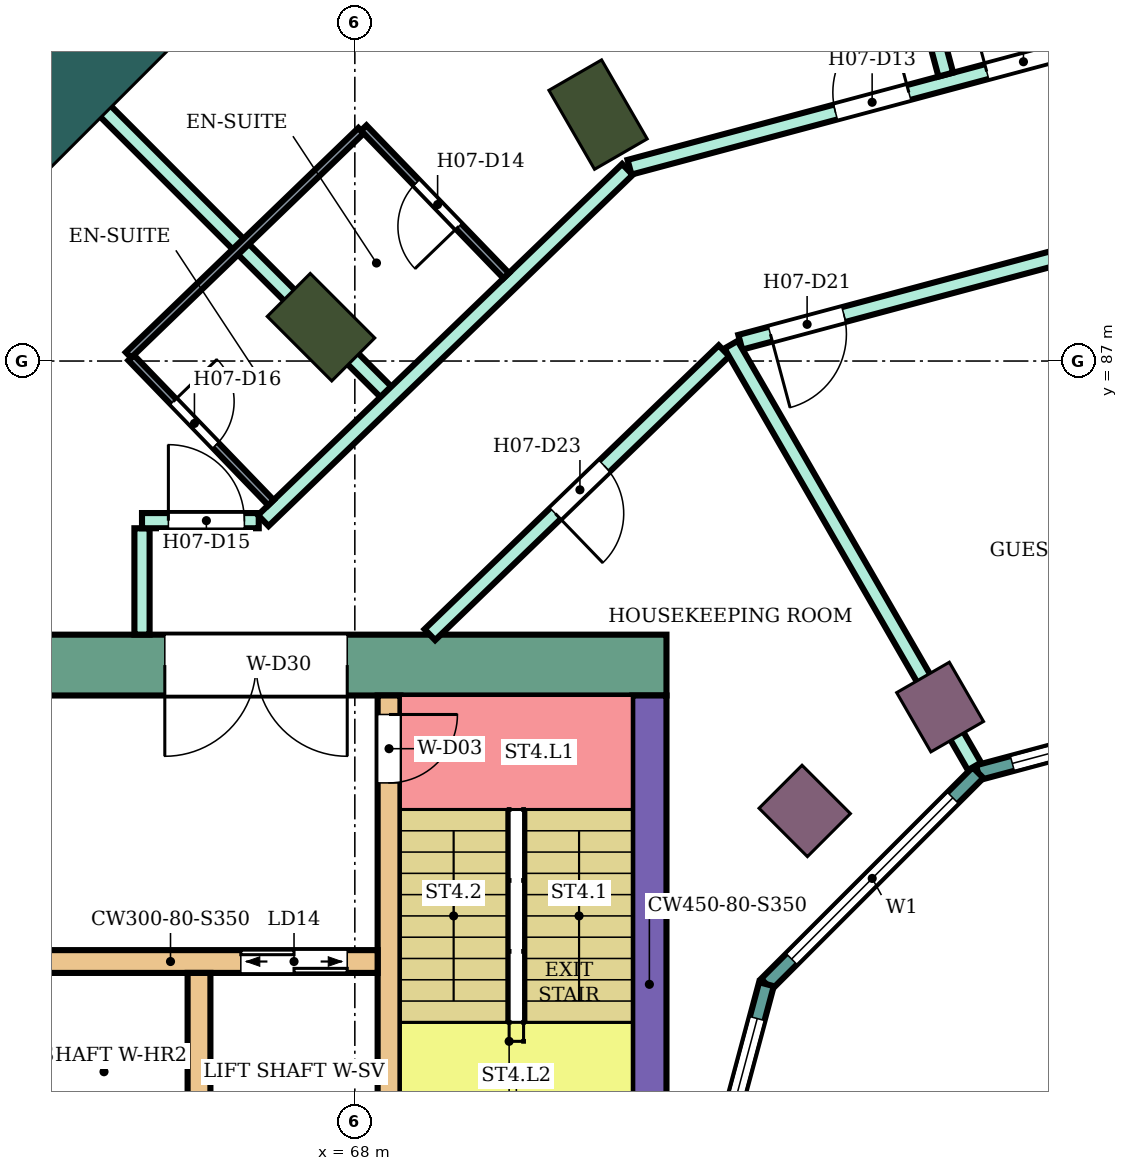
"""IFC4 building model, lengths in metres.
Left out: names, types, materials, properties, quantities, classifications, styles, units other than length and angle.
Written with IfcOpenShell. Run it as: python <this file> out.ifc"""

import sys

from ifc_helpers import new_model, si_unit, direction, frame, frame_2d, origin, origin_2d, place, context, subcontext, project, spatial, rectangle, extrude, element, fill, save


model = new_model("IFC4")
c1 = context("Model", 3, precision=1e-05, world=origin(), true_north=direction((0.0, 1.0)))
c2 = subcontext(c1, "Body", "Model", "MODEL_VIEW")
j1 = project(units=[si_unit("LENGTHUNIT", "METRE"), si_unit("PLANEANGLEUNIT", "RADIAN")], contexts=[c1])
p1 = place(None, origin())
s1 = spatial("IfcSite", under=j1, at=p1, CompositionType="ELEMENT")
p2 = place(p1, origin())
s2 = spatial("IfcBuilding", under=s1, at=p2, CompositionType="ELEMENT")
p3 = place(p2, frame((0.0, 0.0, 105.2)))
s3 = spatial("IfcBuildingStorey", under=s2, at=p3, CompositionType="ELEMENT", Elevation=105.2)
for number, where, z_axis, x_axis in (
    (1, (71.2, 90.242, 0.0), (0.0, 0.0, 1.0), (-0.5, 0.866, 0.0)),
    (2, (67.555, 87.445, 0.0), (0.0, 0.0, 1.0), (-0.707, 0.707, 0.0)),
):
    element("IfcColumn", number, at=place(p3, frame(where, z_axis=z_axis, x_axis=x_axis)), inside=s3, PredefinedType="COLUMN", context=c2, shape_type="SweptSolid", body=[
        extrude(rectangle(XDim=1.2, YDim=0.8, at=origin_2d()), origin(), (0.0, 0.0, 1.0), 3.8),
    ])
for number, where, z_axis, x_axis in (
    (3, (75.7, 82.448, 0.0), (0.0, 0.0, 1.0), (-0.5, 0.866, 0.0)),
    (4, (73.919, 81.081, 0.0), (0.0, 0.0, 1.0), (-0.707, 0.707, 0.0)),
):
    element("IfcColumn", number, at=place(p3, frame(where, z_axis=z_axis, x_axis=x_axis)), inside=s3, PredefinedType="COLUMN", context=c2, shape_type="SweptSolid", body=[
        extrude(rectangle(XDim=0.9, YDim=0.8, at=origin_2d()), origin(), (0.0, 0.0, 1.0), 3.8),
    ])
p4 = place(p3, frame((64.09, 90.91, 0.0), z_axis=(0.0, 0.0, 1.0), x_axis=(-0.707106781187, 0.707106781187, 0.0)))
e5 = element("IfcColumn", 5, at=p4, inside=s3, PredefinedType="COLUMN", context=c2, shape_type="SweptSolid", body=[
    extrude(rectangle(XDim=1.8, YDim=2.4, at=origin_2d()), origin(), (0.0, 0.0, 1.0), 3.8),
])
p5 = place(p3, frame((72.1, 83.0, 0.0), z_axis=(0.0, 0.0, 1.0), x_axis=(-1.0, 0.0, 0.0)))
e6 = element("IfcWall", 6, at=p5, inside=s3, PredefinedType="SHEAR", context=c2, shape_type="SweptSolid", body=[
    extrude(rectangle(XDim=14.7, YDim=0.8, at=frame_2d((7.35, 0.0))), origin(), (0.0, 0.0, 1.0), 3.45),
])
p6 = place(p5, frame((4.2, 0.0, 0.0)))
e7 = element("IfcOpeningElement", 7, at=p6, cuts=e6, PredefinedType="OPENING", context=c2, shape_type="SweptSolid", body=[
    extrude(rectangle(XDim=2.4, YDim=2.4, at=frame_2d((1.2, 1.2))), frame((0.0, 0.41, 0.0), z_axis=(0.0, -1.0, 0.0), x_axis=(1.0, 0.0, 0.0)), (0.0, 0.0, 1.0), 0.82),
])
p7 = place(p3, frame((71.875, 82.6, 0.0), z_axis=(0.0, 0.0, 1.0), x_axis=(0.0, -1.0, 0.0)))
e8 = element("IfcWall", 8, at=p7, inside=s3, PredefinedType="SHEAR", context=c2, shape_type="SweptSolid", body=[
    extrude(rectangle(XDim=7.6, YDim=0.45, at=frame_2d((3.8, 0.0))), origin(), (0.0, 0.0, 1.0), 3.45),
])
p8 = place(p3, frame((68.45, 82.6, 0.0), z_axis=(0.0, 0.0, 1.0), x_axis=(0.0, -1.0, 0.0)))
e9 = element("IfcWall", 9, at=p8, inside=s3, PredefinedType="SHEAR", context=c2, shape_type="SweptSolid", body=[
    extrude(rectangle(XDim=7.6, YDim=0.3, at=frame_2d((3.8, 0.0))), origin(), (0.0, 0.0, 1.0), 3.45),
])
p9 = place(p8, frame((0.25, 0.0, 0.0)))
e10 = element("IfcOpeningElement", 10, at=p9, cuts=e9, PredefinedType="OPENING", context=c2, shape_type="SweptSolid", body=[
    extrude(rectangle(XDim=0.9, YDim=2.1, at=frame_2d((0.45, 1.05))), frame((0.0, 0.16, 0.0), z_axis=(0.0, -1.0, 0.0), x_axis=(1.0, 0.0, 0.0)), (0.0, 0.0, 1.0), 0.32),
])
p10 = place(p3, frame((68.3, 79.1, 0.0), z_axis=(0.0, 0.0, 1.0), x_axis=(-1.0, 0.0, 0.0)))
e11 = element("IfcWall", 11, at=p10, inside=s3, PredefinedType="SHEAR", context=c2, shape_type="SweptSolid", body=[
    extrude(rectangle(XDim=10.9, YDim=0.3, at=frame_2d((5.45, 0.0))), origin(), (0.0, 0.0, 1.0), 3.45),
])
p11 = place(p10, frame((0.4, 0.0, 0.0)))
e12 = element("IfcOpeningElement", 12, at=p11, cuts=e11, PredefinedType="OPENING", context=c2, shape_type="SweptSolid", body=[
    extrude(rectangle(XDim=1.4, YDim=2.1, at=frame_2d((0.7, 1.05))), frame((0.0, 0.16, 0.0), z_axis=(0.0, -1.0, 0.0), x_axis=(1.0, 0.0, 0.0)), (0.0, 0.0, 1.0), 0.32),
])
p12 = place(p10, frame((5.4, 0.0, 0.0)))
e13 = element("IfcOpeningElement", 13, at=p12, cuts=e11, PredefinedType="OPENING", context=c2, shape_type="SweptSolid", body=[
    extrude(rectangle(XDim=1.4, YDim=2.1, at=frame_2d((0.7, 1.05))), frame((0.0, 0.16, 0.0), z_axis=(0.0, -1.0, 0.0), x_axis=(1.0, 0.0, 0.0)), (0.0, 0.0, 1.0), 0.32),
])
p13 = place(p10, frame((8.1, 0.0, 0.0)))
e14 = element("IfcOpeningElement", 14, at=p13, cuts=e11, PredefinedType="OPENING", context=c2, shape_type="SweptSolid", body=[
    extrude(rectangle(XDim=1.0, YDim=2.1, at=frame_2d((0.5, 1.05))), frame((0.0, 0.16, 0.0), z_axis=(0.0, -1.0, 0.0), x_axis=(1.0, 0.0, 0.0)), (0.0, 0.0, 1.0), 0.32),
])
p14 = place(p3, frame((65.95, 78.95, 0.0), z_axis=(0.0, 0.0, 1.0), x_axis=(0.0, -1.0, 0.0)))
e15 = element("IfcWall", 15, at=p14, inside=s3, PredefinedType="SHEAR", context=c2, shape_type="SweptSolid", body=[
    extrude(rectangle(XDim=2.55, YDim=0.3, at=frame_2d((1.275, 0.0))), origin(), (0.0, 0.0, 1.0), 3.45),
])
p15 = place(p3, frame((80.0, 82.604, 0.0), z_axis=(0.0, 0.0, 1.0), x_axis=(-0.965933654434, -0.258789828301, 0.0)))
e16 = element("IfcWall", 16, at=p15, inside=s3, PredefinedType="NOTDEFINED", context=c2, shape_type="SweptSolid", body=[
    extrude(rectangle(XDim=3.936, YDim=0.2, at=frame_2d((1.968, 0.0))), origin(), (0.0, 0.0, 1.0), 3.8),
])
p16 = place(p15, frame((0.468, 0.0, 0.9)))
e17 = element("IfcOpeningElement", 17, at=p16, cuts=e16, PredefinedType="OPENING", context=c2, shape_type="SweptSolid", body=[
    extrude(rectangle(XDim=3.0, YDim=2.3, at=frame_2d((1.5, 1.15))), frame((0.0, 0.11, 0.0), z_axis=(0.0, -1.0, 0.0), x_axis=(1.0, 0.0, 0.0)), (0.0, 0.0, 1.0), 0.22),
])
p17 = place(p3, frame((76.198, 81.585, 0.0), z_axis=(0.0, 0.0, 1.0), x_axis=(-0.707106781187, -0.707106781187, 0.0)))
e18 = element("IfcWall", 18, at=p17, inside=s3, PredefinedType="NOTDEFINED", context=c2, shape_type="SweptSolid", body=[
    extrude(rectangle(XDim=3.936, YDim=0.2, at=frame_2d((1.968, 0.0))), origin(), (0.0, 0.0, 1.0), 3.8),
])
p18 = place(p17, frame((0.468, 0.0, 0.9)))
e19 = element("IfcOpeningElement", 19, at=p18, cuts=e18, PredefinedType="OPENING", context=c2, shape_type="SweptSolid", body=[
    extrude(rectangle(XDim=3.0, YDim=2.3, at=frame_2d((1.5, 1.15))), frame((0.0, 0.11, 0.0), z_axis=(0.0, -1.0, 0.0), x_axis=(1.0, 0.0, 0.0)), (0.0, 0.0, 1.0), 0.22),
])
p19 = place(p3, frame((73.415, 78.802, 0.0), z_axis=(0.0, 0.0, 1.0), x_axis=(-0.258789828301, -0.965933654434, 0.0)))
e20 = element("IfcWall", 20, at=p19, inside=s3, PredefinedType="NOTDEFINED", context=c2, shape_type="SweptSolid", body=[
    extrude(rectangle(XDim=3.936, YDim=0.2, at=frame_2d((1.968, 0.0))), origin(), (0.0, 0.0, 1.0), 3.8),
])
p20 = place(p19, frame((0.468, 0.0, 0.9)))
e21 = element("IfcOpeningElement", 21, at=p20, cuts=e20, PredefinedType="OPENING", context=c2, shape_type="SweptSolid", body=[
    extrude(rectangle(XDim=3.0, YDim=2.3, at=frame_2d((1.5, 1.15))), frame((0.0, 0.11, 0.0), z_axis=(0.0, -1.0, 0.0), x_axis=(1.0, 0.0, 0.0)), (0.0, 0.0, 1.0), 0.22),
])
p21 = place(p3, frame((63.598, 91.407, 0.0), z_axis=(0.0, 0.0, 1.0), x_axis=(0.706981183365, -0.707232356703, 0.0)))
e22 = element("IfcWall", 22, at=p21, inside=s3, PredefinedType="PARTITIONING", context=c2, shape_type="SweptSolid", body=[
    extrude(rectangle(XDim=6.804, YDim=0.2, at=frame_2d((3.402, 0.0))), origin(), (0.0, 0.0, 1.0), 3.35),
])
p22 = place(p3, frame((65.2, 83.401, 0.0), z_axis=(0.0, 0.0, 1.0), x_axis=(0.0, 1.0, 0.0)))
e23 = element("IfcWall", 23, at=p22, inside=s3, PredefinedType="PARTITIONING", context=c2, shape_type="SweptSolid", body=[
    extrude(rectangle(XDim=1.399, YDim=0.2, at=frame_2d((0.7, 0.0))), origin(), (0.0, 0.0, 1.0), 3.35),
])
p23 = place(p3, frame((65.2, 84.9, 0.0), z_axis=(0.0, 0.0, 1.0), x_axis=(1.0, 0.0, 0.0)))
e24 = element("IfcWall", 24, at=p23, inside=s3, PredefinedType="PARTITIONING", context=c2, shape_type="SweptSolid", body=[
    extrude(rectangle(XDim=1.536, YDim=0.2, at=frame_2d((0.768, 0.0))), origin(), (0.0, 0.0, 1.0), 3.35),
])
p24 = place(p23, frame((0.347, 0.0, 0.0)))
e25 = element("IfcOpeningElement", 25, at=p24, cuts=e24, PredefinedType="OPENING", context=c2, shape_type="SweptSolid", body=[
    extrude(rectangle(XDim=1.0, YDim=2.1, at=frame_2d((0.5, 1.05))), frame((0.0, 0.11, 0.0), z_axis=(0.0, -1.0, 0.0), x_axis=(1.0, 0.0, 0.0)), (0.0, 0.0, 1.0), 0.22),
])
p25 = place(p3, frame((66.795, 84.9, 0.0), z_axis=(0.0, 0.0, 1.0), x_axis=(0.719793233107, 0.694188520197, 0.0)))
e26 = element("IfcWall", 26, at=p25, inside=s3, PredefinedType="PARTITIONING", context=c2, shape_type="SweptSolid", body=[
    extrude(rectangle(XDim=6.656, YDim=0.2, at=frame_2d((3.328, 0.0))), origin(), (0.0, 0.0, 1.0), 3.35),
])
p26 = place(p3, frame((68.987, 83.4, 0.0), z_axis=(0.0, 0.0, 1.0), x_axis=(0.719547721855, 0.694442996922, 0.0)))
e27 = element("IfcWall", 27, at=p26, inside=s3, PredefinedType="PARTITIONING", context=c2, shape_type="SweptSolid", body=[
    extrude(rectangle(XDim=5.378, YDim=0.2, at=frame_2d((2.689, 0.0))), origin(), (0.0, 0.0, 1.0), 3.35),
])
p27 = place(p26, frame((2.294, 0.0, 0.0)))
e28 = element("IfcOpeningElement", 28, at=p27, cuts=e27, PredefinedType="OPENING", context=c2, shape_type="SweptSolid", body=[
    extrude(rectangle(XDim=0.9, YDim=2.1, at=frame_2d((0.45, 1.05))), frame((0.0, 0.11, 0.0), z_axis=(0.0, -1.0, 0.0), x_axis=(1.0, 0.0, 0.0)), (0.0, 0.0, 1.0), 0.22),
])
p28 = place(p3, frame((71.614, 89.55, 0.0), z_axis=(0.0, 0.0, 1.0), x_axis=(0.96597505802, 0.258635239832, 0.0)))
e29 = element("IfcWall", 29, at=p28, inside=s3, PredefinedType="PARTITIONING", context=c2, shape_type="SweptSolid", body=[
    extrude(rectangle(XDim=8.592, YDim=0.2, at=frame_2d((4.296, 0.0))), origin(), (0.0, 0.0, 1.0), 3.35),
])
p29 = place(p28, frame((4.865, 0.0, 0.0)))
e30 = element("IfcOpeningElement", 30, at=p29, cuts=e29, PredefinedType="OPENING", context=c2, shape_type="SweptSolid", body=[
    extrude(rectangle(XDim=1.0, YDim=2.1, at=frame_2d((0.5, 1.05))), frame((0.0, 0.11, 0.0), z_axis=(0.0, -1.0, 0.0), x_axis=(1.0, 0.0, 0.0)), (0.0, 0.0, 1.0), 0.22),
])
p30 = place(p28, frame((2.804, 0.0, 0.0)))
e31 = element("IfcOpeningElement", 31, at=p30, cuts=e29, PredefinedType="OPENING", context=c2, shape_type="SweptSolid", body=[
    extrude(rectangle(XDim=1.0, YDim=2.1, at=frame_2d((0.5, 1.05))), frame((0.0, 0.11, 0.0), z_axis=(0.0, -1.0, 0.0), x_axis=(1.0, 0.0, 0.0)), (0.0, 0.0, 1.0), 0.22),
])
p31 = place(p3, frame((73.071, 87.247, 0.0), z_axis=(0.0, 0.0, 1.0), x_axis=(0.965931651205, 0.258797305243, 0.0)))
e32 = element("IfcWall", 32, at=p31, inside=s3, PredefinedType="PARTITIONING", context=c2, shape_type="SweptSolid", body=[
    extrude(rectangle(XDim=7.043, YDim=0.2, at=frame_2d((3.521, 0.0))), origin(), (0.0, 0.0, 1.0), 3.35),
])
p32 = place(p31, frame((0.41, 0.0, 0.0)))
e33 = element("IfcOpeningElement", 33, at=p32, cuts=e32, PredefinedType="OPENING", context=c2, shape_type="SweptSolid", body=[
    extrude(rectangle(XDim=1.0, YDim=2.1, at=frame_2d((0.5, 1.05))), frame((0.0, 0.11, 0.0), z_axis=(0.0, -1.0, 0.0), x_axis=(1.0, 0.0, 0.0)), (0.0, 0.0, 1.0), 0.22),
])
p33 = place(p3, frame((72.95, 87.215, 0.0), z_axis=(0.0, 0.0, 1.0), x_axis=(0.499881928498, -0.866093561667, 0.0)))
e34 = element("IfcWall", 34, at=p33, inside=s3, PredefinedType="PARTITIONING", context=c2, shape_type="SweptSolid", body=[
    extrude(rectangle(XDim=6.405, YDim=0.2, at=frame_2d((3.203, 0.0))), origin(), (0.0, 0.0, 1.0), 3.35),
])
p34 = place(p3, frame((73.323, 99.919, 0.0), z_axis=(0.0, 0.0, 1.0), x_axis=(0.258818956582, -0.965925850008, 0.0)))
e35 = element("IfcWall", 35, at=p34, inside=s3, PredefinedType="PARTITIONING", context=c2, shape_type="SweptSolid", body=[
    extrude(rectangle(XDim=9.473, YDim=0.2, at=frame_2d((4.737, 0.0))), origin(), (0.0, 0.0, 1.0), 3.35),
])
p35 = place(p3, frame((65.057, 87.043, 0.0), z_axis=(0.0, 0.0, 1.0), x_axis=(0.694324808789, -0.719661767708, 0.0)))
e36 = element("IfcWall", 36, at=p35, inside=s3, PredefinedType="PARTITIONING", context=c2, shape_type="SweptSolid", body=[
    extrude(rectangle(XDim=2.65, YDim=0.1, at=frame_2d((1.325, 0.0))), origin(), (0.0, 0.0, 1.0), 3.35),
])
p36 = place(p35, frame((0.8, 0.0, 0.0)))
e37 = element("IfcOpeningElement", 37, at=p36, cuts=e36, PredefinedType="OPENING", context=c2, shape_type="SweptSolid", body=[
    extrude(rectangle(XDim=0.8, YDim=2.1, at=frame_2d((0.4, 1.05))), frame((0.0, 0.06, 0.0), z_axis=(0.0, -1.0, 0.0), x_axis=(1.0, 0.0, 0.0)), (0.0, 0.0, 1.0), 0.12),
])
p37 = place(p3, frame((65.022, 87.079, 0.0), z_axis=(0.0, 0.0, 1.0), x_axis=(0.719684404795, 0.694301344875, 0.0)))
e38 = element("IfcWall", 38, at=p37, inside=s3, PredefinedType="PARTITIONING", context=c2, shape_type="SweptSolid", body=[
    extrude(rectangle(XDim=4.251, YDim=0.1, at=frame_2d((2.125, 0.0))), origin(), (0.0, 0.0, 1.0), 3.35),
])
p38 = place(p3, frame((68.117, 90.066, 0.0), z_axis=(0.0, 0.0, 1.0), x_axis=(0.694379853631, -0.719608656751, 0.0)))
e39 = element("IfcWall", 39, at=p38, inside=s3, PredefinedType="PARTITIONING", context=c2, shape_type="SweptSolid", body=[
    extrude(rectangle(XDim=2.7, YDim=0.1, at=frame_2d((1.35, 0.0))), origin(), (0.0, 0.0, 1.0), 3.35),
])
p39 = place(p38, frame((1.0, 0.0, 0.0)))
e40 = element("IfcOpeningElement", 40, at=p39, cuts=e39, PredefinedType="OPENING", context=c2, shape_type="SweptSolid", body=[
    extrude(rectangle(XDim=0.8, YDim=2.1, at=frame_2d((0.4, 1.05))), frame((0.0, 0.06, 0.0), z_axis=(0.0, -1.0, 0.0), x_axis=(1.0, 0.0, 0.0)), (0.0, 0.0, 1.0), 0.12),
])
p40 = place(p16, origin())
e41 = element("IfcWindow", 41, at=p40, inside=s3, PartitioningType="SINGLE_PANEL", PredefinedType="WINDOW", context=c2, shape_type="SweptSolid", body=[
    extrude(rectangle(XDim=3.0, YDim=2.3, at=frame_2d((1.5, 1.15))), frame((0.0, 0.03, 0.0), z_axis=(0.0, -1.0, 0.0), x_axis=(1.0, 0.0, 0.0)), (0.0, 0.0, 1.0), 0.06),
])
fill(e17, e41)
p41 = place(p18, origin())
e42 = element("IfcWindow", 42, at=p41, inside=s3, PartitioningType="SINGLE_PANEL", PredefinedType="WINDOW", context=c2, shape_type="SweptSolid", body=[
    extrude(rectangle(XDim=3.0, YDim=2.3, at=frame_2d((1.5, 1.15))), frame((0.0, 0.03, 0.0), z_axis=(0.0, -1.0, 0.0), x_axis=(1.0, 0.0, 0.0)), (0.0, 0.0, 1.0), 0.06),
])
fill(e19, e42)
p42 = place(p20, origin())
e43 = element("IfcWindow", 43, at=p42, inside=s3, PartitioningType="SINGLE_PANEL", PredefinedType="WINDOW", context=c2, shape_type="SweptSolid", body=[
    extrude(rectangle(XDim=3.0, YDim=2.3, at=frame_2d((1.5, 1.15))), frame((0.0, 0.03, 0.0), z_axis=(0.0, -1.0, 0.0), x_axis=(1.0, 0.0, 0.0)), (0.0, 0.0, 1.0), 0.06),
])
fill(e21, e43)
p43 = place(p29, origin())
e44 = element("IfcDoor", 44, at=p43, inside=s3, OperationType="SINGLE_SWING_LEFT", PredefinedType="DOOR", context=c2, shape_type="SweptSolid", body=[
    extrude(rectangle(XDim=1.0, YDim=2.1, at=frame_2d((0.5, 1.05))), frame((0.0, 0.025, 0.0), z_axis=(0.0, -1.0, 0.0), x_axis=(1.0, 0.0, 0.0)), (0.0, 0.0, 1.0), 0.05),
])
fill(e30, e44)
p44 = place(p30, origin())
e45 = element("IfcDoor", 45, at=p44, inside=s3, OperationType="SINGLE_SWING_RIGHT", PredefinedType="DOOR", context=c2, shape_type="SweptSolid", body=[
    extrude(rectangle(XDim=1.0, YDim=2.1, at=frame_2d((0.5, 1.05))), frame((0.0, 0.025, 0.0), z_axis=(0.0, -1.0, 0.0), x_axis=(1.0, 0.0, 0.0)), (0.0, 0.0, 1.0), 0.05),
])
fill(e31, e45)
p45 = place(p39, frame((0.8, 0.0, 0.0), z_axis=(0.0, 0.0, 1.0), x_axis=(-1.0, 0.0, 0.0)))
e46 = element("IfcDoor", 46, at=p45, inside=s3, OperationType="SINGLE_SWING_LEFT", PredefinedType="DOOR", context=c2, shape_type="SweptSolid", body=[
    extrude(rectangle(XDim=0.8, YDim=2.1, at=frame_2d((0.4, 1.05))), frame((0.0, 0.025, 0.0), z_axis=(0.0, -1.0, 0.0), x_axis=(1.0, 0.0, 0.0)), (0.0, 0.0, 1.0), 0.05),
])
fill(e40, e46)
p46 = place(p24, origin())
e47 = element("IfcDoor", 47, at=p46, inside=s3, OperationType="SINGLE_SWING_LEFT", PredefinedType="DOOR", context=c2, shape_type="SweptSolid", body=[
    extrude(rectangle(XDim=1.0, YDim=2.1, at=frame_2d((0.5, 1.05))), frame((0.0, 0.025, 0.0), z_axis=(0.0, -1.0, 0.0), x_axis=(1.0, 0.0, 0.0)), (0.0, 0.0, 1.0), 0.05),
])
fill(e25, e47)
p47 = place(p36, origin())
e48 = element("IfcDoor", 48, at=p47, inside=s3, OperationType="SINGLE_SWING_LEFT", PredefinedType="DOOR", context=c2, shape_type="SweptSolid", body=[
    extrude(rectangle(XDim=0.8, YDim=2.1, at=frame_2d((0.4, 1.05))), frame((0.0, 0.025, 0.0), z_axis=(0.0, -1.0, 0.0), x_axis=(1.0, 0.0, 0.0)), (0.0, 0.0, 1.0), 0.05),
])
fill(e37, e48)
p48 = place(p32, frame((1.0, 0.0, 0.0), z_axis=(0.0, 0.0, 1.0), x_axis=(-1.0, 0.0, 0.0)))
e49 = element("IfcDoor", 49, at=p48, inside=s3, OperationType="SINGLE_SWING_RIGHT", PredefinedType="DOOR", context=c2, shape_type="SweptSolid", body=[
    extrude(rectangle(XDim=1.0, YDim=2.1, at=frame_2d((0.5, 1.05))), frame((0.0, 0.025, 0.0), z_axis=(0.0, -1.0, 0.0), x_axis=(1.0, 0.0, 0.0)), (0.0, 0.0, 1.0), 0.05),
])
fill(e33, e49)
p49 = place(p27, frame((0.9, 0.0, 0.0), z_axis=(0.0, 0.0, 1.0), x_axis=(-1.0, 0.0, 0.0)))
e50 = element("IfcDoor", 50, at=p49, inside=s3, OperationType="SINGLE_SWING_RIGHT", PredefinedType="DOOR", context=c2, shape_type="SweptSolid", body=[
    extrude(rectangle(XDim=0.9, YDim=2.1, at=frame_2d((0.45, 1.05))), frame((0.0, 0.025, 0.0), z_axis=(0.0, -1.0, 0.0), x_axis=(1.0, 0.0, 0.0)), (0.0, 0.0, 1.0), 0.05),
])
fill(e28, e50)
p50 = place(p9, origin())
e51 = element("IfcDoor", 51, at=p50, inside=s3, OperationType="SINGLE_SWING_LEFT", PredefinedType="DOOR", context=c2, shape_type="SweptSolid", body=[
    extrude(rectangle(XDim=0.9, YDim=2.1, at=frame_2d((0.45, 1.05))), frame((0.0, 0.025, 0.0), z_axis=(0.0, -1.0, 0.0), x_axis=(1.0, 0.0, 0.0)), (0.0, 0.0, 1.0), 0.05),
])
fill(e10, e51)
p51 = place(p11, origin())
e52 = element("IfcDoor", 52, at=p51, inside=s3, OperationType="DOUBLE_DOOR_SLIDING", PredefinedType="DOOR", context=c2, shape_type="SweptSolid", body=[
    extrude(rectangle(XDim=1.4, YDim=2.1, at=frame_2d((0.7, 1.05))), frame((0.0, 0.025, 0.0), z_axis=(0.0, -1.0, 0.0), x_axis=(1.0, 0.0, 0.0)), (0.0, 0.0, 1.0), 0.05),
])
fill(e12, e52)
p52 = place(p6, origin())
e53 = element("IfcDoor", 53, at=p52, inside=s3, OperationType="DOUBLE_DOOR_SINGLE_SWING", PredefinedType="DOOR", context=c2, shape_type="SweptSolid", body=[
    extrude(rectangle(XDim=2.4, YDim=2.4, at=frame_2d((1.2, 1.2))), frame((0.0, 0.025, 0.0), z_axis=(0.0, -1.0, 0.0), x_axis=(1.0, 0.0, 0.0)), (0.0, 0.0, 1.0), 0.05),
])
fill(e7, e53)
save(model, sys.argv[1])
